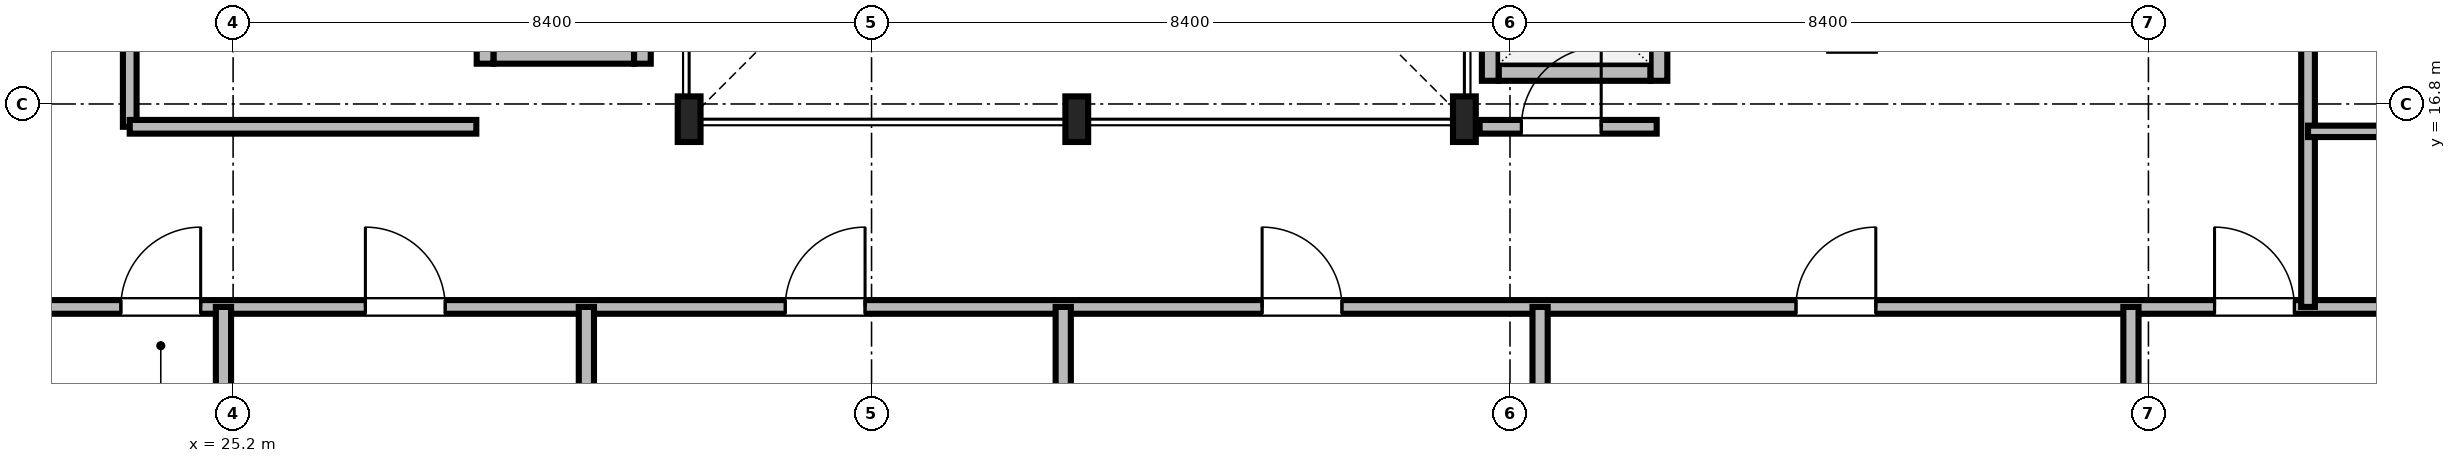
"""IFC4 building model, lengths in metres.
Left out: names, types, materials, properties, quantities, classifications, styles, units other than length and angle.
Written with IfcOpenShell. Run it as: python <this file> out.ifc"""

import sys

from ifc_helpers import new_model, si_unit, direction, frame, frame_2d, origin, origin_2d, place, context, subcontext, project, spatial, rectangle, i_section, extrude, source, transform, mapped, element, fill, save


model = new_model("IFC4")
c1 = context("Model", 3, precision=1e-05, world=origin(), true_north=direction((0.0, 1.0)))
c2 = subcontext(c1, "Body", "Model", "MODEL_VIEW")
j1 = project(units=[si_unit("LENGTHUNIT", "METRE"), si_unit("PLANEANGLEUNIT", "RADIAN")], contexts=[c1])
p1 = place(None, origin())
s1 = spatial("IfcSite", under=j1, at=p1, CompositionType="ELEMENT")
p2 = place(p1, origin())
s2 = spatial("IfcBuilding", under=s1, at=p2, CompositionType="ELEMENT")
p3 = place(p2, frame((0.0, 0.0, 270.35)))
s3 = spatial("IfcBuildingStorey", under=s2, at=p3, CompositionType="ELEMENT", Elevation=270.35)
m1 = source(origin(), c2, "Body", "SweptSolid", [
    extrude(i_section(OverallWidth=0.3, OverallDepth=0.6, WebThickness=0.015, FlangeThickness=0.03, FilletRadius=0.027, at=origin_2d()), origin(), (0.0, 0.0, 1.0), 3.65),
])
for number, where, z_axis, x_axis in (
    (1, (31.2, 16.6, 0.0), (0.0, 0.0, 1.0), (1.0, 0.0, 0.0)),
    (2, (36.3, 16.6, 0.0), (0.0, 0.0, 1.0), (1.0, 0.0, 0.0)),
    (3, (41.4, 16.6, 0.0), (0.0, 0.0, 1.0), (1.0, 0.0, 0.0)),
):
    element("IfcColumn", number, at=place(p3, frame(where, z_axis=z_axis, x_axis=x_axis)), inside=s3, PredefinedType="COLUMN", context=c2, shape_type="MappedRepresentation", body=[
        mapped(m1, transform((0.0, 0.0, 0.0), scale=1.0)),
    ])
m2 = source(origin(), c2, "Body", "SweptSolid", [
    extrude(rectangle(XDim=2.0, YDim=0.22, at=frame_2d((1.0, 0.0))), origin(), (0.0, 0.0, 1.0), 3.65),
])
p4 = place(p3, frame((41.85, 17.215, 0.0), z_axis=(0.0, 0.0, 1.0), x_axis=(1.0, 0.0, 0.0)))
e4 = element("IfcWall", 4, at=p4, inside=s3, PredefinedType="SOLIDWALL", context=c2, shape_type="MappedRepresentation", body=[
    mapped(m2, transform((0.0, 0.0, 0.0), scale=1.0)),
])
m3 = source(origin(), c2, "Body", "SweptSolid", [
    extrude(rectangle(XDim=2.19, YDim=0.22, at=frame_2d((1.095, 0.0))), origin(), (0.0, 0.0, 1.0), 3.65),
])
p5 = place(p3, frame((41.74, 17.105, 0.0), z_axis=(0.0, 0.0, 1.0), x_axis=(0.0, 1.0, 0.0)))
e5 = element("IfcWall", 5, at=p5, inside=s3, PredefinedType="SOLIDWALL", context=c2, shape_type="MappedRepresentation", body=[
    mapped(m3, transform((0.0, 0.0, 0.0), scale=1.0)),
])
p6 = place(p3, frame((43.96, 17.105, 0.0), z_axis=(0.0, 0.0, 1.0), x_axis=(0.0, 1.0, 0.0)))
e6 = element("IfcWall", 6, at=p6, inside=s3, PredefinedType="SOLIDWALL", context=c2, shape_type="MappedRepresentation", body=[
    mapped(m3, transform((0.0, 0.0, 0.0), scale=1.0)),
])
m4 = source(origin(), c2, "Body", "SweptSolid", [
    extrude(rectangle(XDim=1.1, YDim=2.2, at=frame_2d((0.55, 1.1))), frame((0.0, 0.12, 0.0), z_axis=(0.0, -1.0, 0.0), x_axis=(1.0, 0.0, 0.0)), (0.0, 0.0, 1.0), 0.24),
])
p7 = place(p6, frame((0.545, 0.0, 0.0)))
e7 = element("IfcOpeningElement", 7, at=p7, cuts=e6, PredefinedType="OPENING", context=c2, shape_type="MappedRepresentation", body=[
    mapped(m4, transform((0.0, 0.0, 0.0), scale=1.0)),
])
m5 = source(origin(), c2, "Body", "SweptSolid", [
    extrude(rectangle(XDim=1.85, YDim=0.22, at=frame_2d((0.925, 0.0))), origin(), (0.0, 0.0, 1.0), 3.65),
])
p8 = place(p3, frame((28.625, 17.44, 0.0), z_axis=(0.0, 0.0, 1.0), x_axis=(1.0, 0.0, 0.0)))
e8 = element("IfcWall", 8, at=p8, inside=s3, PredefinedType="SOLIDWALL", context=c2, shape_type="MappedRepresentation", body=[
    mapped(m5, transform((0.0, 0.0, 0.0), scale=1.0)),
])
m6 = source(origin(), c2, "Body", "SweptSolid", [
    extrude(rectangle(XDim=2.54, YDim=0.22, at=frame_2d((1.27, 0.0))), origin(), (0.0, 0.0, 1.0), 3.65),
])
for number, where, z_axis, x_axis in (
    (9, (28.515, 17.33, 0.0), (0.0, 0.0, 1.0), (0.0, 1.0, 0.0)),
    (10, (30.585, 17.33, 0.0), (0.0, 0.0, 1.0), (0.0, 1.0, 0.0)),
):
    element("IfcWall", number, at=place(p3, frame(where, z_axis=z_axis, x_axis=x_axis)), inside=s3, PredefinedType="SOLIDWALL", context=c2, shape_type="MappedRepresentation", body=[
        mapped(m6, transform((0.0, 0.0, 0.0), scale=1.0)),
    ])
m7 = source(origin(), c2, "Body", "SweptSolid", [
    extrude(rectangle(XDim=41.836, YDim=0.18, at=frame_2d((20.918, 0.0))), origin(), (0.0, 0.0, 1.0), 2.892),
])
p9 = place(p3, frame((18.082, 14.13, 0.0), z_axis=(0.0, 0.0, 1.0), x_axis=(1.0, 0.0, 0.0)))
e11 = element("IfcWall", 11, at=p9, inside=s3, PredefinedType="PARTITIONING", context=c2, shape_type="MappedRepresentation", body=[
    mapped(m7, transform((0.0, 0.0, 0.0), scale=1.0)),
])
m8 = source(origin(), c2, "Body", "SweptSolid", [
    extrude(rectangle(XDim=1.05, YDim=2.2, at=frame_2d((0.525, 1.1))), frame((0.0, 0.1, 0.0), z_axis=(0.0, -1.0, 0.0), x_axis=(1.0, 0.0, 0.0)), (0.0, 0.0, 1.0), 0.2),
])
p10 = place(p9, frame((5.641, 0.0, 0.0)))
e12 = element("IfcOpeningElement", 12, at=p10, cuts=e11, PredefinedType="OPENING", context=c2, shape_type="MappedRepresentation", body=[
    mapped(m8, transform((0.0, 0.0, 0.0), scale=1.0)),
])
p11 = place(p9, frame((8.858, 0.0, 0.0)))
e13 = element("IfcOpeningElement", 13, at=p11, cuts=e11, PredefinedType="OPENING", context=c2, shape_type="MappedRepresentation", body=[
    mapped(m8, transform((0.0, 0.0, 0.0), scale=1.0)),
])
p12 = place(p9, frame((14.383, 0.0, 0.0)))
e14 = element("IfcOpeningElement", 14, at=p12, cuts=e11, PredefinedType="OPENING", context=c2, shape_type="MappedRepresentation", body=[
    mapped(m8, transform((0.0, 0.0, 0.0), scale=1.0)),
])
p13 = place(p9, frame((20.657, 0.0, 0.0)))
e15 = element("IfcOpeningElement", 15, at=p13, cuts=e11, PredefinedType="OPENING", context=c2, shape_type="MappedRepresentation", body=[
    mapped(m8, transform((0.0, 0.0, 0.0), scale=1.0)),
])
p14 = place(p9, frame((27.681, 0.0, 0.0)))
e16 = element("IfcOpeningElement", 16, at=p14, cuts=e11, PredefinedType="OPENING", context=c2, shape_type="MappedRepresentation", body=[
    mapped(m8, transform((0.0, 0.0, 0.0), scale=1.0)),
])
p15 = place(p9, frame((33.188, 0.0, 0.0)))
e17 = element("IfcOpeningElement", 17, at=p15, cuts=e11, PredefinedType="OPENING", context=c2, shape_type="MappedRepresentation", body=[
    mapped(m8, transform((0.0, 0.0, 0.0), scale=1.0)),
])
m9 = source(origin(), c2, "Body", "SweptSolid", [
    extrude(rectangle(XDim=26.97, YDim=0.18, at=frame_2d((13.485, 0.0))), origin(), (0.0, 0.0, 1.0), 3.092),
])
p16 = place(p3, frame((52.5, 14.13, 0.0), z_axis=(0.0, 0.0, 1.0), x_axis=(0.0, 1.0, 0.0)))
e18 = element("IfcWall", 18, at=p16, inside=s3, PredefinedType="PARTITIONING", context=c2, shape_type="MappedRepresentation", body=[
    mapped(m9, transform((0.0, 0.0, 0.0), scale=1.0)),
])
p17 = place(p16, frame((4.009, 0.0, 0.0)))
e19 = element("IfcOpeningElement", 19, at=p17, cuts=e18, PredefinedType="OPENING", context=c2, shape_type="MappedRepresentation", body=[
    mapped(m8, transform((0.0, 0.0, 0.0), scale=1.0)),
])
p18 = place(p16, frame((10.696, 0.0, 0.0)))
e20 = element("IfcOpeningElement", 20, at=p18, cuts=e18, PredefinedType="OPENING", context=c2, shape_type="MappedRepresentation", body=[
    mapped(m8, transform((0.0, 0.0, 0.0), scale=1.0)),
])
p19 = place(p16, frame((17.384, 0.0, 0.0)))
e21 = element("IfcOpeningElement", 21, at=p19, cuts=e18, PredefinedType="OPENING", context=c2, shape_type="MappedRepresentation", body=[
    mapped(m8, transform((0.0, 0.0, 0.0), scale=1.0)),
])
p20 = place(p16, frame((24.071, 0.0, 0.0)))
e22 = element("IfcOpeningElement", 22, at=p20, cuts=e18, PredefinedType="OPENING", context=c2, shape_type="MappedRepresentation", body=[
    mapped(m8, transform((0.0, 0.0, 0.0), scale=1.0)),
])
m10 = source(origin(), c2, "Body", "SweptSolid", [
    extrude(rectangle(XDim=11.94, YDim=0.18, at=frame_2d((5.97, 0.0))), origin(), (0.0, 0.0, 1.0), 3.092),
])
p21 = place(p3, frame((23.84, 16.5, 0.0), z_axis=(0.0, 0.0, 1.0), x_axis=(0.0, 1.0, 0.0)))
e23 = element("IfcWall", 23, at=p21, inside=s3, PredefinedType="PARTITIONING", context=c2, shape_type="MappedRepresentation", body=[
    mapped(m10, transform((0.0, 0.0, 0.0), scale=1.0)),
])
p22 = place(p21, frame((4.5, 0.0, 0.0)))
e24 = element("IfcOpeningElement", 24, at=p22, cuts=e23, PredefinedType="OPENING", context=c2, shape_type="MappedRepresentation", body=[
    mapped(m8, transform((0.0, 0.0, 0.0), scale=1.0)),
])
m11 = source(origin(), c2, "Body", "SweptSolid", [
    extrude(rectangle(XDim=2.33, YDim=0.18, at=frame_2d((1.165, 0.0))), origin(), (0.0, 0.0, 1.0), 3.092),
])
p23 = place(p3, frame((41.6, 16.5, 0.0), z_axis=(0.0, 0.0, 1.0), x_axis=(1.0, 0.0, 0.0)))
e25 = element("IfcWall", 25, at=p23, inside=s3, PredefinedType="PARTITIONING", context=c2, shape_type="MappedRepresentation", body=[
    mapped(m11, transform((0.0, 0.0, 0.0), scale=1.0)),
])
p24 = place(p23, frame((0.55, 0.0, 0.0)))
e26 = element("IfcOpeningElement", 26, at=p24, cuts=e25, PredefinedType="OPENING", context=c2, shape_type="MappedRepresentation", body=[
    mapped(m8, transform((0.0, 0.0, 0.0), scale=1.0)),
])
m12 = source(origin(), c2, "Body", "SweptSolid", [
    extrude(rectangle(XDim=9.848, YDim=0.2, at=frame_2d((4.924, 0.0))), origin(), (0.0, 0.0, 1.0), 2.892),
])
for number, where, z_axis, x_axis in (
    (27, (25.073, 4.282, 0.0), (0.0, 0.0, 1.0), (0.0, 1.0, 0.0)),
    (28, (29.848, 4.282, 0.0), (0.0, 0.0, 1.0), (0.0, 1.0, 0.0)),
):
    element("IfcWall", number, at=place(p3, frame(where, z_axis=z_axis, x_axis=x_axis)), inside=s3, PredefinedType="PARTITIONING", context=c2, shape_type="MappedRepresentation", body=[
        mapped(m12, transform((0.0, 0.0, 0.0), scale=1.0)),
    ])
m13 = source(origin(), c2, "Body", "SweptSolid", [
    extrude(rectangle(XDim=10.04, YDim=0.2, at=frame_2d((5.02, 0.0))), origin(), (0.0, 0.0, 1.0), 2.892),
])
p25 = place(p3, frame((36.122, 4.09, 0.0), z_axis=(0.0, 0.0, 1.0), x_axis=(0.0, 1.0, 0.0)))
e29 = element("IfcWall", 29, at=p25, inside=s3, PredefinedType="PARTITIONING", context=c2, shape_type="MappedRepresentation", body=[
    mapped(m13, transform((0.0, 0.0, 0.0), scale=1.0)),
])
for number, where, z_axis, x_axis in (
    (30, (42.396, 4.282, 0.0), (0.0, 0.0, 1.0), (0.0, 1.0, 0.0)),
    (31, (50.17, 4.282, 0.0), (0.0, 0.0, 1.0), (0.0, 1.0, 0.0)),
):
    element("IfcWall", number, at=place(p3, frame(where, z_axis=z_axis, x_axis=x_axis)), inside=s3, PredefinedType="PARTITIONING", context=c2, shape_type="MappedRepresentation", body=[
        mapped(m12, transform((0.0, 0.0, 0.0), scale=1.0)),
    ])
m14 = source(origin(), c2, "Body", "SweptSolid", [
    extrude(rectangle(XDim=4.56, YDim=0.18, at=frame_2d((2.28, 0.0))), origin(), (0.0, 0.0, 1.0), 3.092),
])
p26 = place(p3, frame((23.84, 16.5, 0.0), z_axis=(0.0, 0.0, 1.0), x_axis=(1.0, 0.0, 0.0)))
e32 = element("IfcWall", 32, at=p26, inside=s3, PredefinedType="PARTITIONING", context=c2, shape_type="MappedRepresentation", body=[
    mapped(m14, transform((0.0, 0.0, 0.0), scale=1.0)),
])
m15 = source(origin(), c2, "Body", "SweptSolid", [
    extrude(rectangle(XDim=2.36, YDim=0.15, at=frame_2d((1.18, 0.0))), origin(), (0.0, 0.0, 1.0), 3.65),
])
p27 = place(p3, frame((52.5, 16.44, 0.0), z_axis=(0.0, 0.0, 1.0), x_axis=(1.0, 0.0, 0.0)))
e33 = element("IfcWall", 33, at=p27, inside=s3, PredefinedType="PARTITIONING", context=c2, shape_type="MappedRepresentation", body=[
    mapped(m15, transform((0.0, 0.0, 0.0), scale=1.0)),
])
m16 = source(origin(), c2, "Body", "SweptSolid", [
    extrude(rectangle(XDim=1.05, YDim=2.2, at=frame_2d((0.525, 1.1))), frame((0.0, 0.025, 0.0), z_axis=(0.0, -1.0, 0.0), x_axis=(1.0, 0.0, 0.0)), (0.0, 0.0, 1.0), 0.05),
])
p28 = place(p10, origin())
e34 = element("IfcDoor", 34, at=p28, inside=s3, OperationType="SINGLE_SWING_RIGHT", PredefinedType="DOOR", context=c2, shape_type="MappedRepresentation", body=[
    mapped(m16, transform((0.0, 0.0, 0.0), scale=1.0)),
])
fill(e12, e34)
p29 = place(p11, origin())
e35 = element("IfcDoor", 35, at=p29, inside=s3, OperationType="SINGLE_SWING_LEFT", PredefinedType="DOOR", context=c2, shape_type="MappedRepresentation", body=[
    mapped(m16, transform((0.0, 0.0, 0.0), scale=1.0)),
])
fill(e13, e35)
p30 = place(p12, origin())
e36 = element("IfcDoor", 36, at=p30, inside=s3, OperationType="SINGLE_SWING_RIGHT", PredefinedType="DOOR", context=c2, shape_type="MappedRepresentation", body=[
    mapped(m16, transform((0.0, 0.0, 0.0), scale=1.0)),
])
fill(e14, e36)
p31 = place(p13, origin())
e37 = element("IfcDoor", 37, at=p31, inside=s3, OperationType="SINGLE_SWING_LEFT", PredefinedType="DOOR", context=c2, shape_type="MappedRepresentation", body=[
    mapped(m16, transform((0.0, 0.0, 0.0), scale=1.0)),
])
fill(e15, e37)
p32 = place(p14, origin())
e38 = element("IfcDoor", 38, at=p32, inside=s3, OperationType="SINGLE_SWING_RIGHT", PredefinedType="DOOR", context=c2, shape_type="MappedRepresentation", body=[
    mapped(m16, transform((0.0, 0.0, 0.0), scale=1.0)),
])
fill(e16, e38)
p33 = place(p15, origin())
e39 = element("IfcDoor", 39, at=p33, inside=s3, OperationType="SINGLE_SWING_LEFT", PredefinedType="DOOR", context=c2, shape_type="MappedRepresentation", body=[
    mapped(m16, transform((0.0, 0.0, 0.0), scale=1.0)),
])
fill(e17, e39)
p34 = place(p24, origin())
e40 = element("IfcDoor", 40, at=p34, inside=s3, OperationType="SINGLE_SWING_RIGHT", PredefinedType="DOOR", context=c2, shape_type="MappedRepresentation", body=[
    mapped(m16, transform((0.0, 0.0, 0.0), scale=1.0)),
])
fill(e26, e40)
save(model, sys.argv[1])
